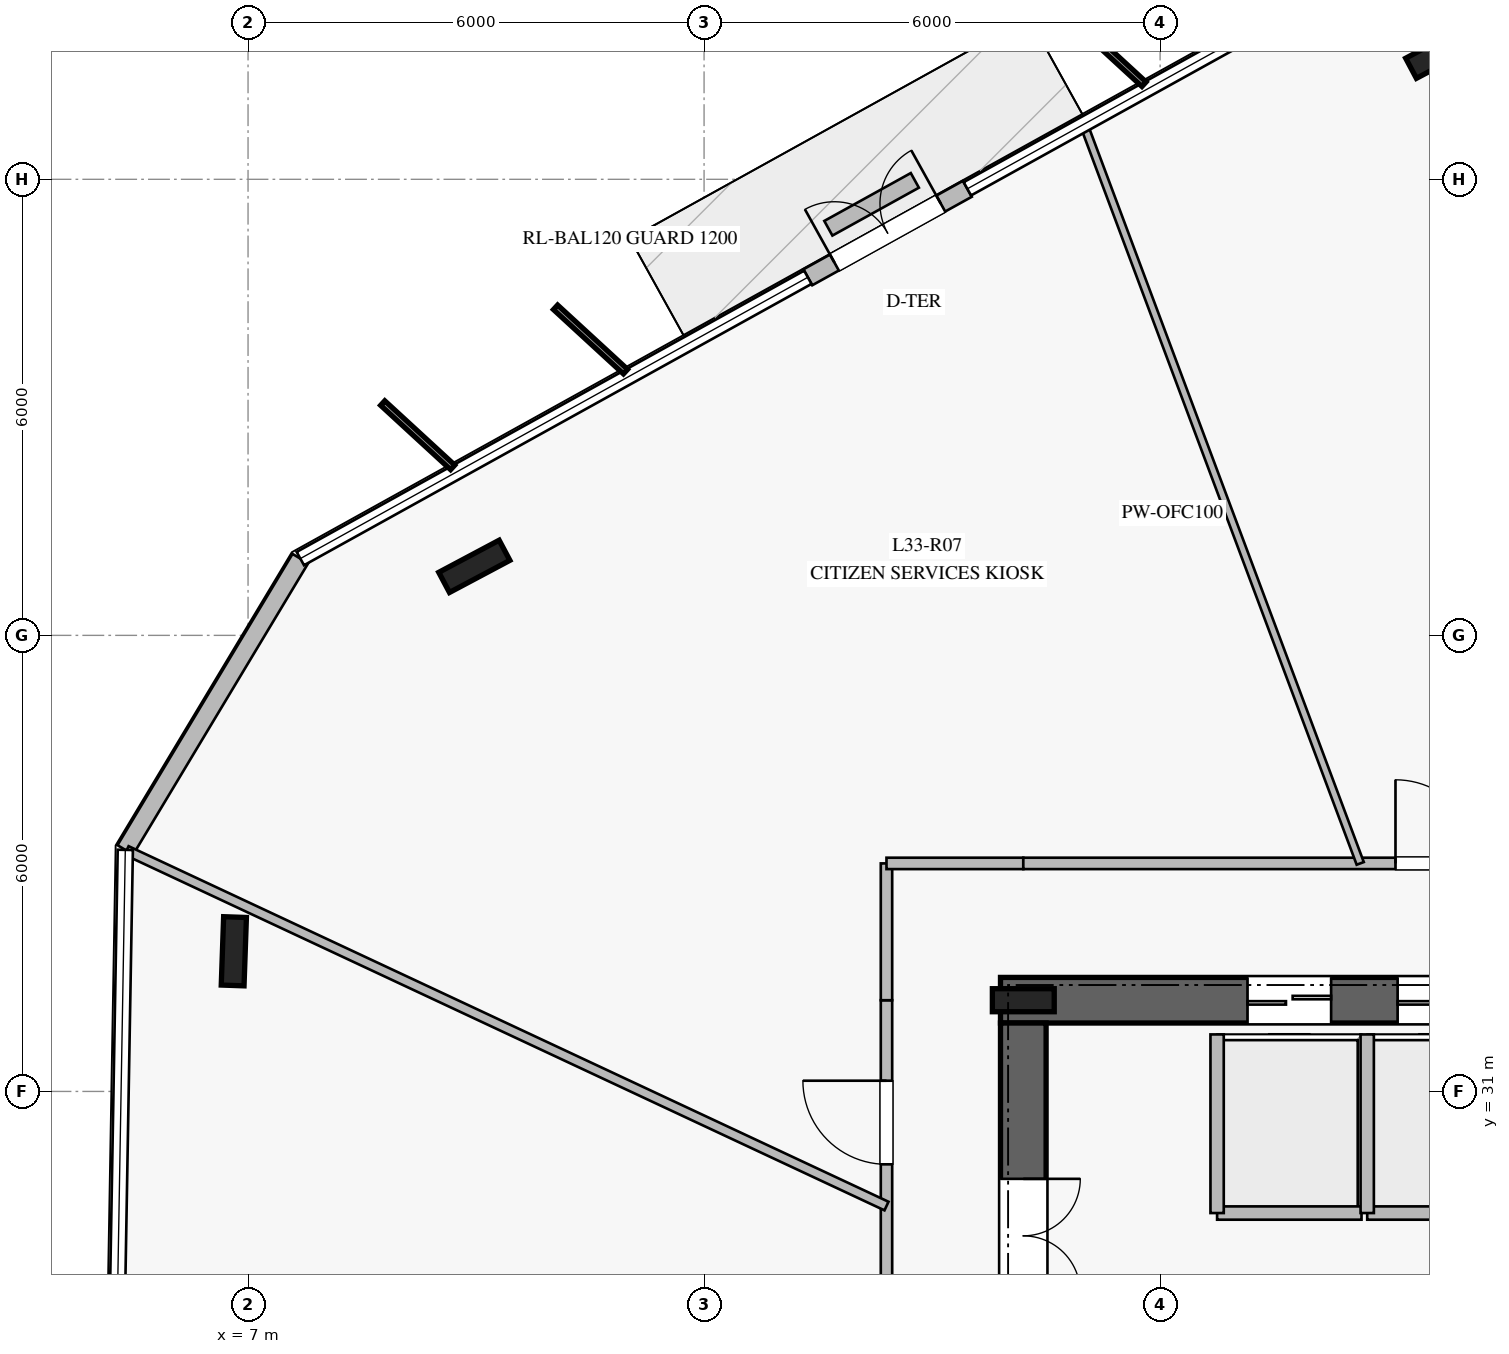
"""IFC4 building model, lengths in metres.
Left out: names, types, materials, properties, quantities, classifications, styles, units other than length and angle.
Written with IfcOpenShell. Run it as: python <this file> out.ifc"""

import sys

from ifc_helpers import new_model, si_unit, direction, frame, frame_2d, origin, origin_2d, place, context, subcontext, project, spatial, rectangle, i_section, extrude, element, fill, save


model = new_model("IFC4")
c1 = context("Model", 3, precision=1e-05, world=origin(), true_north=direction((0.0, 1.0)))
c2 = subcontext(c1, "Body", "Model", "MODEL_VIEW")
j1 = project(units=[si_unit("LENGTHUNIT", "METRE"), si_unit("PLANEANGLEUNIT", "RADIAN")], contexts=[c1])
p1 = place(None, origin())
s1 = spatial("IfcSite", under=j1, at=p1, CompositionType="ELEMENT")
p2 = place(p1, origin())
s2 = spatial("IfcBuilding", under=s1, at=p2, CompositionType="ELEMENT")
p3 = place(p2, frame((0.0, 0.0, 138.4)))
s3 = spatial("IfcBuildingStorey", under=s2, at=p3, CompositionType="ELEMENT", Elevation=138.4)
p4 = place(p3, frame((33.1, 32.2, 0.0), z_axis=(0.0, 0.0, 1.0), x_axis=(-1.0, 0.0, 0.0)))
e1 = element("IfcWall", 1, at=p4, inside=s3, PredefinedType="SHEAR", context=c2, shape_type="SweptSolid", body=[
    extrude(rectangle(XDim=16.2, YDim=0.6, at=frame_2d((8.1, 0.0))), origin(), (0.0, 0.0, 1.0), 3.76),
])
p5 = place(p4, frame((5.05, 0.0, 0.0)))
e2 = element("IfcOpeningElement", 2, at=p5, cuts=e1, PredefinedType="OPENING", context=c2, shape_type="SweptSolid", body=[
    extrude(rectangle(XDim=1.2, YDim=2.25, at=frame_2d((0.6, 1.125))), frame((0.0, 0.31, 0.0), z_axis=(0.0, -1.0, 0.0), x_axis=(1.0, 0.0, 0.0)), (0.0, 0.0, 1.0), 0.62),
])
p6 = place(p4, frame((11.85, 0.0, 0.0)))
e3 = element("IfcOpeningElement", 3, at=p6, cuts=e1, PredefinedType="OPENING", context=c2, shape_type="SweptSolid", body=[
    extrude(rectangle(XDim=1.1, YDim=2.2, at=frame_2d((0.55, 1.1))), frame((0.0, 0.31, 0.0), z_axis=(0.0, -1.0, 0.0), x_axis=(1.0, 0.0, 0.0)), (0.0, 0.0, 1.0), 0.62),
])
p7 = place(p4, frame((9.875, 0.0, 0.0)))
e4 = element("IfcOpeningElement", 4, at=p7, cuts=e1, PredefinedType="OPENING", context=c2, shape_type="SweptSolid", body=[
    extrude(rectangle(XDim=1.1, YDim=2.2, at=frame_2d((0.55, 1.1))), frame((0.0, 0.31, 0.0), z_axis=(0.0, -1.0, 0.0), x_axis=(1.0, 0.0, 0.0)), (0.0, 0.0, 1.0), 0.62),
])
p8 = place(p4, frame((7.9, 0.0, 0.0)))
e5 = element("IfcOpeningElement", 5, at=p8, cuts=e1, PredefinedType="OPENING", context=c2, shape_type="SweptSolid", body=[
    extrude(rectangle(XDim=1.1, YDim=2.2, at=frame_2d((0.55, 1.1))), frame((0.0, 0.31, 0.0), z_axis=(0.0, -1.0, 0.0), x_axis=(1.0, 0.0, 0.0)), (0.0, 0.0, 1.0), 0.62),
])
p9 = place(p3, frame((17.2, 31.9, 0.0), z_axis=(0.0, 0.0, 1.0), x_axis=(0.0, -1.0, 0.0)))
e6 = element("IfcWall", 6, at=p9, inside=s3, PredefinedType="SHEAR", context=c2, shape_type="SweptSolid", body=[
    extrude(rectangle(XDim=13.8, YDim=0.6, at=frame_2d((6.9, 0.0))), origin(), (0.0, 0.0, 1.0), 3.76),
])
p10 = place(p9, frame((2.05, 0.0, 0.0)))
e7 = element("IfcOpeningElement", 7, at=p10, cuts=e6, PredefinedType="OPENING", context=c2, shape_type="SweptSolid", body=[
    extrude(rectangle(XDim=1.5, YDim=2.2, at=frame_2d((0.75, 1.1))), frame((0.0, 0.31, 0.0), z_axis=(0.0, -1.0, 0.0), x_axis=(1.0, 0.0, 0.0)), (0.0, 0.0, 1.0), 0.62),
])
p11 = place(p3, frame((17.2, 32.2, 0.0), z_axis=(0.0, 0.0, 1.0), x_axis=(1.0, 0.0, 0.0)))
e8 = element("IfcColumn", 8, at=p11, inside=s3, PredefinedType="COLUMN", context=c2, shape_type="SweptSolid", body=[
    extrude(i_section(OverallWidth=0.303, OverallDepth=0.814, WebThickness=0.021, FlangeThickness=0.04, at=origin_2d()), origin(), (0.0, 0.0, 1.0), 4.0),
])
for number, where, z_axis, x_axis in (
    (9, (22.699, 44.672, 0.0), (0.0, 0.0, 1.0), (0.883, 0.469, 0.0)),
    (10, (9.977, 37.908, 0.0), (0.0, 0.0, 1.0), (0.883, 0.469, 0.0)),
    (11, (6.813, 32.844, 0.0), (0.0, 0.0, 1.0), (0.035, 0.999, 0.0)),
):
    element("IfcColumn", number, at=place(p3, frame(where, z_axis=z_axis, x_axis=x_axis)), inside=s3, PredefinedType="COLUMN", context=c2, shape_type="SweptSolid", body=[
        extrude(i_section(OverallWidth=0.3, OverallDepth=0.9, WebThickness=0.019, FlangeThickness=0.035, at=origin_2d()), origin(), (0.0, 0.0, 1.0), 4.0),
    ])
p12 = place(p3, frame((16.464, 42.875, 0.0), z_axis=(0.0, 0.0, 1.0), x_axis=(-0.874531244889, -0.484969176044, 0.0)))
e12 = element("IfcWall", 12, at=p12, inside=s3, PredefinedType="STANDARD", context=c2, shape_type="SweptSolid", body=[
    extrude(rectangle(XDim=2.4, YDim=0.24, at=frame_2d((1.2, 0.0))), origin(), (0.0, 0.0, 1.0), 3.76),
])
p13 = place(p12, frame((0.4, 0.0, 0.0)))
e13 = element("IfcOpeningElement", 13, at=p13, cuts=e12, PredefinedType="OPENING", context=c2, shape_type="SweptSolid", body=[
    extrude(rectangle(XDim=1.6, YDim=2.25, at=frame_2d((0.8, 1.125))), frame((0.0, 0.13, 0.0), z_axis=(0.0, -1.0, 0.0), x_axis=(1.0, 0.0, 0.0)), (0.0, 0.0, 1.0), 0.26),
])
p14 = place(p3, frame((7.688, 38.01, 0.0), z_axis=(0.0, 0.0, 1.0), x_axis=(-0.515113973, -0.857121691955, 0.0)))
e14 = element("IfcWall", 14, at=p14, inside=s3, PredefinedType="STANDARD", context=c2, shape_type="SweptSolid", body=[
    extrude(rectangle(XDim=4.471, YDim=0.24, at=frame_2d((2.235, 0.0))), origin(), (0.0, 0.0, 1.0), 3.76),
])
p15 = place(p3, frame((15.773, 42.986, 0.0), z_axis=(0.0, 0.0, 1.0), x_axis=(-0.874829292821, -0.484431324774, 0.0)))
e15 = element("IfcWall", 15, at=p15, inside=s3, PredefinedType="USERDEFINED", context=c2, shape_type="SweptSolid", body=[
    extrude(rectangle(XDim=1.301, YDim=0.22, at=frame_2d((0.65, 0.0))), origin(), (0.0, 0.0, 1.0), 0.4),
])
p16 = place(p3, frame((19.75, 29.4, 0.0), z_axis=(0.0, 0.0, 1.0), x_axis=(1.0, 0.0, 0.0)))
e16 = element("IfcWall", 16, at=p16, inside=s3, PredefinedType="PARTITIONING", context=c2, shape_type="SweptSolid", body=[
    extrude(rectangle(XDim=1.9, YDim=0.175, at=frame_2d((0.95, 0.0))), origin(), (0.0, 0.0, 1.0), 3.76),
])
p17 = place(p3, frame((19.75, 29.4, 0.0), z_axis=(0.0, 0.0, 1.0), x_axis=(0.0, 1.0, 0.0)))
e17 = element("IfcWall", 17, at=p17, inside=s3, PredefinedType="PARTITIONING", context=c2, shape_type="SweptSolid", body=[
    extrude(rectangle(XDim=2.35, YDim=0.175, at=frame_2d((1.175, 0.0))), origin(), (0.0, 0.0, 1.0), 3.76),
])
p18 = place(p3, frame((21.725, 29.4, 0.0), z_axis=(0.0, 0.0, 1.0), x_axis=(1.0, 0.0, 0.0)))
e18 = element("IfcWall", 18, at=p18, inside=s3, PredefinedType="PARTITIONING", context=c2, shape_type="SweptSolid", body=[
    extrude(rectangle(XDim=1.9, YDim=0.175, at=frame_2d((0.95, 0.0))), origin(), (0.0, 0.0, 1.0), 3.76),
])
p19 = place(p3, frame((21.725, 29.4, 0.0), z_axis=(0.0, 0.0, 1.0), x_axis=(0.0, 1.0, 0.0)))
e19 = element("IfcWall", 19, at=p19, inside=s3, PredefinedType="PARTITIONING", context=c2, shape_type="SweptSolid", body=[
    extrude(rectangle(XDim=2.35, YDim=0.175, at=frame_2d((1.175, 0.0))), origin(), (0.0, 0.0, 1.0), 3.76),
])
p20 = place(p3, frame((15.4, 25.95, 0.0), z_axis=(0.0, 0.0, 1.0), x_axis=(0.0, 1.0, 0.0)))
e20 = element("IfcWall", 20, at=p20, inside=s3, PredefinedType="PARTITIONING", context=c2, shape_type="SweptSolid", body=[
    extrude(rectangle(XDim=6.25, YDim=0.15, at=frame_2d((3.125, 0.0))), origin(), (0.0, 0.0, 1.0), 3.21),
])
p21 = place(p20, frame((4.091, 0.0, 0.0)))
e21 = element("IfcOpeningElement", 21, at=p21, cuts=e20, PredefinedType="OPENING", context=c2, shape_type="SweptSolid", body=[
    extrude(rectangle(XDim=1.1, YDim=2.2, at=frame_2d((0.55, 1.1))), frame((0.0, 0.085, 0.0), z_axis=(0.0, -1.0, 0.0), x_axis=(1.0, 0.0, 0.0)), (0.0, 0.0, 1.0), 0.17),
])
p22 = place(p3, frame((15.4, 32.2, 0.0), z_axis=(0.0, 0.0, 1.0), x_axis=(0.0, 1.0, 0.0)))
e22 = element("IfcWall", 22, at=p22, inside=s3, PredefinedType="PARTITIONING", context=c2, shape_type="SweptSolid", body=[
    extrude(rectangle(XDim=1.8, YDim=0.15, at=frame_2d((0.9, 0.0))), origin(), (0.0, 0.0, 1.0), 3.21),
])
p23 = place(p3, frame((15.4, 34.0, 0.0), z_axis=(0.0, 0.0, 1.0), x_axis=(1.0, 0.0, 0.0)))
e23 = element("IfcWall", 23, at=p23, inside=s3, PredefinedType="PARTITIONING", context=c2, shape_type="SweptSolid", body=[
    extrude(rectangle(XDim=1.8, YDim=0.15, at=frame_2d((0.9, 0.0))), origin(), (0.0, 0.0, 1.0), 3.76),
])
p24 = place(p3, frame((17.2, 34.0, 0.0), z_axis=(0.0, 0.0, 1.0), x_axis=(1.0, 0.0, 0.0)))
e24 = element("IfcWall", 24, at=p24, inside=s3, PredefinedType="PARTITIONING", context=c2, shape_type="SweptSolid", body=[
    extrude(rectangle(XDim=6.85, YDim=0.15, at=frame_2d((3.425, 0.0))), origin(), (0.0, 0.0, 1.0), 3.21),
])
p25 = place(p24, frame((4.897, 0.0, 0.0)))
e25 = element("IfcOpeningElement", 25, at=p25, cuts=e24, PredefinedType="OPENING", context=c2, shape_type="SweptSolid", body=[
    extrude(rectangle(XDim=1.1, YDim=2.2, at=frame_2d((0.55, 1.1))), frame((0.0, 0.085, 0.0), z_axis=(0.0, -1.0, 0.0), x_axis=(1.0, 0.0, 0.0)), (0.0, 0.0, 1.0), 0.17),
])
p26 = place(p3, frame((21.633, 34.0, 0.0), z_axis=(0.0, 0.0, 1.0), x_axis=(-0.350441839508, 0.936584495453, 0.0)))
e26 = element("IfcWall", 26, at=p26, inside=s3, PredefinedType="MOVABLE", context=c2, shape_type="SweptSolid", body=[
    extrude(rectangle(XDim=10.364, YDim=0.1, at=frame_2d((5.182, 0.0))), origin(), (0.0, 0.0, 1.0), 3.16),
])
p27 = place(p3, frame((15.4, 29.492, 0.0), z_axis=(0.0, 0.0, 1.0), x_axis=(-0.905754360865, 0.423803064847, 0.0)))
e27 = element("IfcWall", 27, at=p27, inside=s3, PredefinedType="PARTITIONING", context=c2, shape_type="SweptSolid", body=[
    extrude(rectangle(XDim=11.038, YDim=0.125, at=frame_2d((5.519, 0.0))), origin(), (0.0, 0.0, 1.0), 3.16),
])
p28 = place(p13, frame((1.6, 0.0, 0.0), z_axis=(0.0, 0.0, 1.0), x_axis=(-1.0, 0.0, 0.0)))
e28 = element("IfcDoor", 28, at=p28, inside=s3, OperationType="DOUBLE_DOOR_SINGLE_SWING", PredefinedType="DOOR", context=c2, shape_type="SweptSolid", body=[
    extrude(rectangle(XDim=1.6, YDim=2.25, at=frame_2d((0.8, 1.125))), frame((0.0, 0.025, 0.0), z_axis=(0.0, -1.0, 0.0), x_axis=(1.0, 0.0, 0.0)), (0.0, 0.0, 1.0), 0.05),
])
fill(e13, e28)
p29 = place(p10, origin())
e29 = element("IfcDoor", 29, at=p29, inside=s3, OperationType="DOUBLE_DOOR_SINGLE_SWING", PredefinedType="DOOR", context=c2, shape_type="SweptSolid", body=[
    extrude(rectangle(XDim=1.5, YDim=2.2, at=frame_2d((0.75, 1.1))), frame((0.0, 0.025, 0.0), z_axis=(0.0, -1.0, 0.0), x_axis=(1.0, 0.0, 0.0)), (0.0, 0.0, 1.0), 0.05),
])
fill(e7, e29)
p30 = place(p6, origin())
e30 = element("IfcDoor", 30, at=p30, inside=s3, OperationType="DOUBLE_DOOR_SLIDING", PredefinedType="DOOR", context=c2, shape_type="SweptSolid", body=[
    extrude(rectangle(XDim=1.1, YDim=2.2, at=frame_2d((0.55, 1.1))), frame((0.0, 0.025, 0.0), z_axis=(0.0, -1.0, 0.0), x_axis=(1.0, 0.0, 0.0)), (0.0, 0.0, 1.0), 0.05),
])
fill(e3, e30)
p31 = place(p7, origin())
e31 = element("IfcDoor", 31, at=p31, inside=s3, OperationType="DOUBLE_DOOR_SLIDING", PredefinedType="DOOR", context=c2, shape_type="SweptSolid", body=[
    extrude(rectangle(XDim=1.1, YDim=2.2, at=frame_2d((0.55, 1.1))), frame((0.0, 0.025, 0.0), z_axis=(0.0, -1.0, 0.0), x_axis=(1.0, 0.0, 0.0)), (0.0, 0.0, 1.0), 0.05),
])
fill(e4, e31)
p32 = place(p25, origin())
e32 = element("IfcDoor", 32, at=p32, inside=s3, OperationType="SINGLE_SWING_LEFT", PredefinedType="DOOR", context=c2, shape_type="SweptSolid", body=[
    extrude(rectangle(XDim=1.1, YDim=2.2, at=frame_2d((0.55, 1.1))), frame((0.0, 0.025, 0.0), z_axis=(0.0, -1.0, 0.0), x_axis=(1.0, 0.0, 0.0)), (0.0, 0.0, 1.0), 0.05),
])
fill(e25, e32)
p33 = place(p21, origin())
e33 = element("IfcDoor", 33, at=p33, inside=s3, OperationType="SINGLE_SWING_RIGHT", PredefinedType="DOOR", context=c2, shape_type="SweptSolid", body=[
    extrude(rectangle(XDim=1.1, YDim=2.2, at=frame_2d((0.55, 1.1))), frame((0.0, 0.025, 0.0), z_axis=(0.0, -1.0, 0.0), x_axis=(1.0, 0.0, 0.0)), (0.0, 0.0, 1.0), 0.05),
])
fill(e21, e33)
save(model, sys.argv[1])
